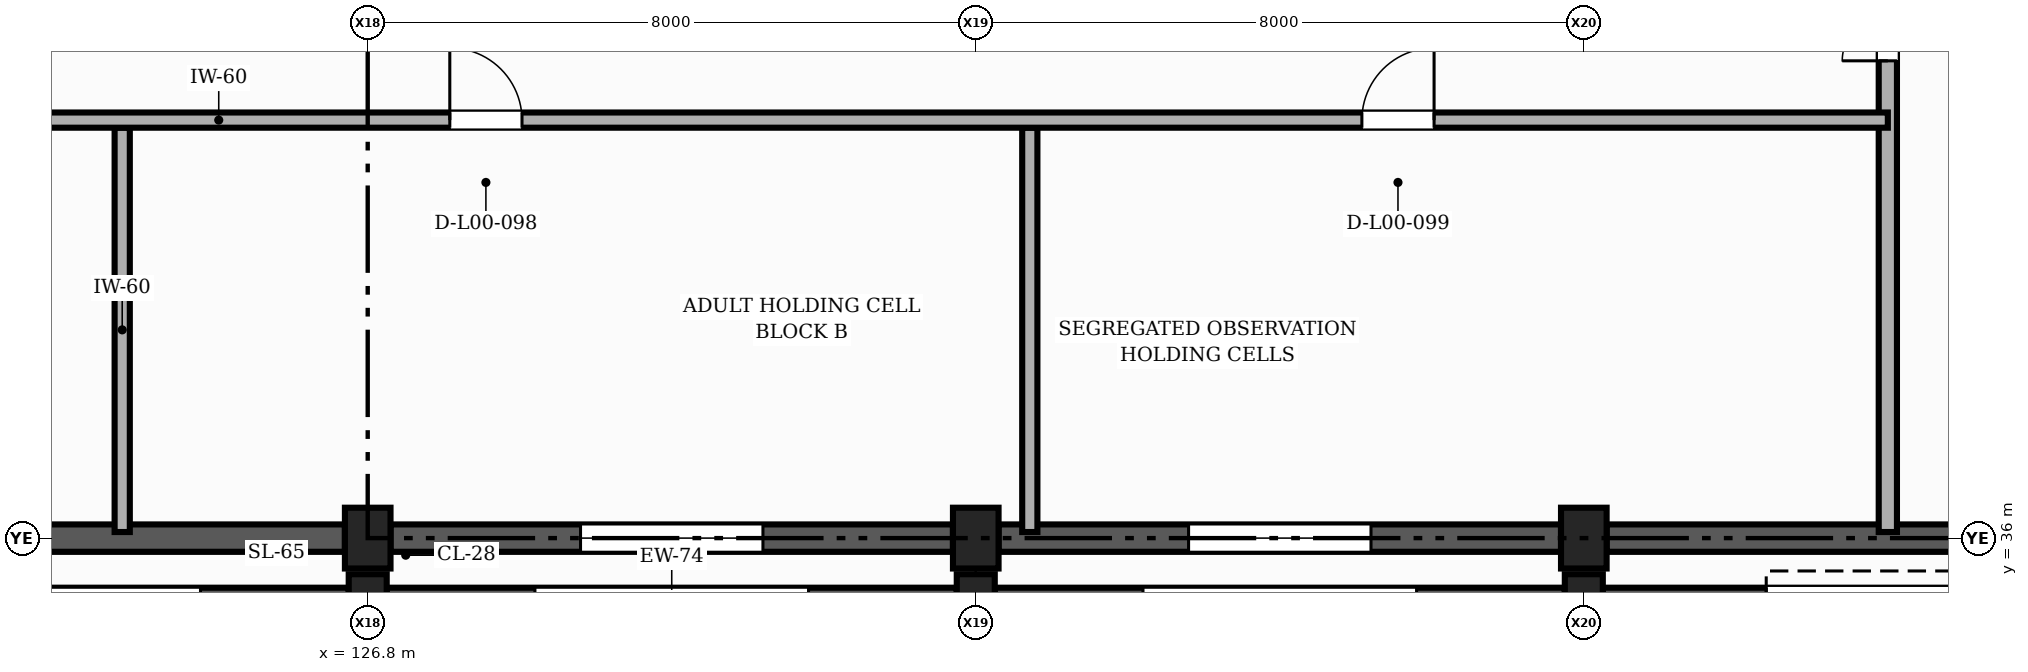
"""IFC4 building model, lengths in metres.
Left out: names, types, materials, properties, quantities, classifications, styles, units other than length and angle.
Written with IfcOpenShell. Run it as: python <this file> out.ifc"""

import sys

from ifc_helpers import new_model, si_unit, direction, frame, frame_2d, origin, origin_2d, place, context, subcontext, project, spatial, rectangle, extrude, element, fill, save


model = new_model("IFC4")
c1 = context("Model", 3, precision=1e-05, world=origin(), true_north=direction((0.0, 1.0)))
c2 = subcontext(c1, "Body", "Model", "MODEL_VIEW")
j1 = project(units=[si_unit("LENGTHUNIT", "METRE"), si_unit("PLANEANGLEUNIT", "RADIAN")], contexts=[c1])
p1 = place(None, origin())
s1 = spatial("IfcSite", under=j1, at=p1, CompositionType="ELEMENT")
p2 = place(p1, origin())
s2 = spatial("IfcBuilding", under=s1, at=p2, CompositionType="ELEMENT")
p3 = place(p2, origin())
s3 = spatial("IfcBuildingStorey", under=s2, at=p3, CompositionType="ELEMENT", Elevation=0.0)
p4 = place(p3, frame((126.8, 35.2, -0.5), z_axis=(0.0, 0.0, 1.0), x_axis=(1.0, 0.0, 0.0)))
e1 = element("IfcColumn", 1, at=p4, inside=s3, PredefinedType="COLUMN", context=c2, shape_type="SweptSolid", body=[
    extrude(rectangle(XDim=0.5, YDim=0.65, at=origin_2d()), origin(), (0.0, 0.0, 1.0), 5.3),
])
p5 = place(p3, frame((126.8, 36.0, -0.5), z_axis=(0.0, 0.0, 1.0), x_axis=(1.0, 0.0, 0.0)))
e2 = element("IfcColumn", 2, at=p5, inside=s3, PredefinedType="COLUMN", context=c2, shape_type="SweptSolid", body=[
    extrude(rectangle(XDim=0.6, YDim=0.8, at=origin_2d()), origin(), (0.0, 0.0, 1.0), 5.3),
])
p6 = place(p3, frame((134.8, 35.2, -0.5), z_axis=(0.0, 0.0, 1.0), x_axis=(1.0, 0.0, 0.0)))
e3 = element("IfcColumn", 3, at=p6, inside=s3, PredefinedType="COLUMN", context=c2, shape_type="SweptSolid", body=[
    extrude(rectangle(XDim=0.5, YDim=0.65, at=origin_2d()), origin(), (0.0, 0.0, 1.0), 5.3),
])
p7 = place(p3, frame((134.8, 36.0, -0.5), z_axis=(0.0, 0.0, 1.0), x_axis=(1.0, 0.0, 0.0)))
e4 = element("IfcColumn", 4, at=p7, inside=s3, PredefinedType="COLUMN", context=c2, shape_type="SweptSolid", body=[
    extrude(rectangle(XDim=0.6, YDim=0.8, at=origin_2d()), origin(), (0.0, 0.0, 1.0), 5.3),
])
p8 = place(p3, frame((142.8, 35.2, -0.5), z_axis=(0.0, 0.0, 1.0), x_axis=(1.0, 0.0, 0.0)))
e5 = element("IfcColumn", 5, at=p8, inside=s3, PredefinedType="COLUMN", context=c2, shape_type="SweptSolid", body=[
    extrude(rectangle(XDim=0.5, YDim=0.65, at=origin_2d()), origin(), (0.0, 0.0, 1.0), 5.3),
])
p9 = place(p3, frame((142.8, 36.0, -0.5), z_axis=(0.0, 0.0, 1.0), x_axis=(1.0, 0.0, 0.0)))
e6 = element("IfcColumn", 6, at=p9, inside=s3, PredefinedType="COLUMN", context=c2, shape_type="SweptSolid", body=[
    extrude(rectangle(XDim=0.6, YDim=0.8, at=origin_2d()), origin(), (0.0, 0.0, 1.0), 5.3),
])
p10 = place(p3, frame((150.55, 35.2, -0.42), z_axis=(0.0, 0.0, 1.0), x_axis=(-1.0, 0.0, 0.0)))
e7 = element("IfcWall", 7, at=p10, inside=s3, PredefinedType="SOLIDWALL", context=c2, shape_type="SweptSolid", body=[
    extrude(rectangle(XDim=7.5, YDim=0.295, at=frame_2d((3.75, 0.0))), origin(), (0.0, 0.0, 1.0), 4.333),
])
p11 = place(p10, frame((2.15, 0.0, 0.42)))
e8 = element("IfcOpeningElement", 8, at=p11, cuts=e7, PredefinedType="OPENING", context=c2, shape_type="SweptSolid", body=[
    extrude(rectangle(XDim=3.2, YDim=2.8, at=frame_2d((1.6, 1.4))), frame((0.0, 0.157, 0.0), z_axis=(0.0, -1.0, 0.0), x_axis=(1.0, 0.0, 0.0)), (0.0, 0.0, 1.0), 0.315),
])
p12 = place(p3, frame((142.55, 35.2, -0.42), z_axis=(0.0, 0.0, 1.0), x_axis=(-1.0, 0.0, 0.0)))
e9 = element("IfcWall", 9, at=p12, inside=s3, PredefinedType="SOLIDWALL", context=c2, shape_type="SweptSolid", body=[
    extrude(rectangle(XDim=7.5, YDim=0.295, at=frame_2d((3.75, 0.0))), origin(), (0.0, 0.0, 1.0), 4.333),
])
p13 = place(p12, frame((1.95, 0.0, 2.47)))
e10 = element("IfcOpeningElement", 10, at=p13, cuts=e9, PredefinedType="OPENING", context=c2, shape_type="SweptSolid", body=[
    extrude(rectangle(XDim=3.6, YDim=1.2, at=frame_2d((1.8, 0.6))), frame((0.0, 0.157, 0.0), z_axis=(0.0, -1.0, 0.0), x_axis=(1.0, 0.0, 0.0)), (0.0, 0.0, 1.0), 0.315),
])
p14 = place(p3, frame((134.55, 35.2, -0.42), z_axis=(0.0, 0.0, 1.0), x_axis=(-1.0, 0.0, 0.0)))
e11 = element("IfcWall", 11, at=p14, inside=s3, PredefinedType="SOLIDWALL", context=c2, shape_type="SweptSolid", body=[
    extrude(rectangle(XDim=7.5, YDim=0.295, at=frame_2d((3.75, 0.0))), origin(), (0.0, 0.0, 1.0), 4.333),
])
p15 = place(p14, frame((1.95, 0.0, 2.47)))
e12 = element("IfcOpeningElement", 12, at=p15, cuts=e11, PredefinedType="OPENING", context=c2, shape_type="SweptSolid", body=[
    extrude(rectangle(XDim=3.6, YDim=1.2, at=frame_2d((1.8, 0.6))), frame((0.0, 0.157, 0.0), z_axis=(0.0, -1.0, 0.0), x_axis=(1.0, 0.0, 0.0)), (0.0, 0.0, 1.0), 0.315),
])
p16 = place(p3, frame((126.55, 35.2, -0.42), z_axis=(0.0, 0.0, 1.0), x_axis=(-1.0, 0.0, 0.0)))
e13 = element("IfcWall", 13, at=p16, inside=s3, PredefinedType="SOLIDWALL", context=c2, shape_type="SweptSolid", body=[
    extrude(rectangle(XDim=7.5, YDim=0.295, at=frame_2d((3.75, 0.0))), origin(), (0.0, 0.0, 1.0), 4.333),
])
p17 = place(p16, frame((1.95, 0.0, 2.47)))
e14 = element("IfcOpeningElement", 14, at=p17, cuts=e13, PredefinedType="OPENING", context=c2, shape_type="SweptSolid", body=[
    extrude(rectangle(XDim=3.6, YDim=1.2, at=frame_2d((1.8, 0.6))), frame((0.0, 0.157, 0.0), z_axis=(0.0, -1.0, 0.0), x_axis=(1.0, 0.0, 0.0)), (0.0, 0.0, 1.0), 0.315),
])
p18 = place(p3, frame((119.1, 36.0, -0.42), z_axis=(0.0, 0.0, 1.0), x_axis=(1.0, 0.0, 0.0)))
e15 = element("IfcWall", 15, at=p18, inside=s3, PredefinedType="SOLIDWALL", context=c2, shape_type="SweptSolid", body=[
    extrude(rectangle(XDim=7.4, YDim=0.36, at=frame_2d((3.7, 0.0))), origin(), (0.0, 0.0, 1.0), 4.13),
])
p19 = place(p3, frame((127.1, 36.0, -0.42), z_axis=(0.0, 0.0, 1.0), x_axis=(1.0, 0.0, 0.0)))
e16 = element("IfcWall", 16, at=p19, inside=s3, PredefinedType="SOLIDWALL", context=c2, shape_type="SweptSolid", body=[
    extrude(rectangle(XDim=7.4, YDim=0.36, at=frame_2d((3.7, 0.0))), origin(), (0.0, 0.0, 1.0), 4.13),
])
p20 = place(p19, frame((2.5, 0.0, 2.52)))
e17 = element("IfcOpeningElement", 17, at=p20, cuts=e16, PredefinedType="OPENING", context=c2, shape_type="SweptSolid", body=[
    extrude(rectangle(XDim=2.4, YDim=0.75, at=frame_2d((1.2, 0.375))), frame((0.0, 0.19, 0.0), z_axis=(0.0, -1.0, 0.0), x_axis=(1.0, 0.0, 0.0)), (0.0, 0.0, 1.0), 0.38),
])
p21 = place(p3, frame((135.1, 36.0, -0.42), z_axis=(0.0, 0.0, 1.0), x_axis=(1.0, 0.0, 0.0)))
e18 = element("IfcWall", 18, at=p21, inside=s3, PredefinedType="SOLIDWALL", context=c2, shape_type="SweptSolid", body=[
    extrude(rectangle(XDim=7.4, YDim=0.36, at=frame_2d((3.7, 0.0))), origin(), (0.0, 0.0, 1.0), 4.13),
])
p22 = place(p21, frame((2.5, 0.0, 2.52)))
e19 = element("IfcOpeningElement", 19, at=p22, cuts=e18, PredefinedType="OPENING", context=c2, shape_type="SweptSolid", body=[
    extrude(rectangle(XDim=2.4, YDim=0.75, at=frame_2d((1.2, 0.375))), frame((0.0, 0.19, 0.0), z_axis=(0.0, -1.0, 0.0), x_axis=(1.0, 0.0, 0.0)), (0.0, 0.0, 1.0), 0.38),
])
p23 = place(p3, frame((143.1, 36.0, -0.42), z_axis=(0.0, 0.0, 1.0), x_axis=(1.0, 0.0, 0.0)))
e20 = element("IfcWall", 20, at=p23, inside=s3, PredefinedType="SOLIDWALL", context=c2, shape_type="SweptSolid", body=[
    extrude(rectangle(XDim=7.4, YDim=0.36, at=frame_2d((3.7, 0.0))), origin(), (0.0, 0.0, 1.0), 4.13),
])
for number, where, z_axis, x_axis in (
    (21, (123.57, 36.08, 0.0), (0.0, 0.0, 1.0), (0.0, 1.0, 0.0)),
    (22, (135.511, 36.08, 0.0), (0.0, 0.0, 1.0), (0.0, 1.0, 0.0)),
):
    element("IfcWall", number, at=place(p3, frame(where, z_axis=z_axis, x_axis=x_axis)), inside=s3, PredefinedType="PARTITIONING", context=c2, shape_type="SweptSolid", body=[
        extrude(rectangle(XDim=5.32, YDim=0.2, at=frame_2d((2.66, 0.0))), origin(), (0.0, 0.0, 1.0), 3.695),
    ])
p24 = place(p3, frame((146.8, 36.08, 0.0), z_axis=(0.0, 0.0, 1.0), x_axis=(0.0, 1.0, 0.0)))
e23 = element("IfcWall", 23, at=p24, inside=s3, PredefinedType="PARTITIONING", context=c2, shape_type="SweptSolid", body=[
    extrude(rectangle(XDim=15.84, YDim=0.24, at=frame_2d((7.92, 0.0))), origin(), (0.0, 0.0, 1.0), 3.695),
])
p25 = place(p24, frame((6.2, 0.0, 0.0)))
e24 = element("IfcOpeningElement", 24, at=p25, cuts=e23, PredefinedType="OPENING", context=c2, shape_type="SweptSolid", body=[
    extrude(rectangle(XDim=1.2, YDim=2.15, at=frame_2d((0.6, 1.075))), frame((0.0, 0.13, 0.0), z_axis=(0.0, -1.0, 0.0), x_axis=(1.0, 0.0, 0.0)), (0.0, 0.0, 1.0), 0.26),
])
p26 = place(p3, frame((102.88, 41.5, 0.0), z_axis=(0.0, 0.0, 1.0), x_axis=(1.0, 0.0, 0.0)))
e25 = element("IfcWall", 25, at=p26, inside=s3, PredefinedType="PARTITIONING", context=c2, shape_type="SweptSolid", body=[
    extrude(rectangle(XDim=43.92, YDim=0.2, at=frame_2d((21.96, 0.0))), origin(), (0.0, 0.0, 1.0), 3.695),
])
p27 = place(p26, frame((3.5, 0.0, 0.0)))
e26 = element("IfcOpeningElement", 26, at=p27, cuts=e25, PredefinedType="OPENING", context=c2, shape_type="SweptSolid", body=[
    extrude(rectangle(XDim=0.95, YDim=2.15, at=frame_2d((0.475, 1.075))), frame((0.0, 0.11, 0.0), z_axis=(0.0, -1.0, 0.0), x_axis=(1.0, 0.0, 0.0)), (0.0, 0.0, 1.0), 0.22),
])
p28 = place(p26, frame((13.0, 0.0, 0.0)))
e27 = element("IfcOpeningElement", 27, at=p28, cuts=e25, PredefinedType="OPENING", context=c2, shape_type="SweptSolid", body=[
    extrude(rectangle(XDim=0.95, YDim=2.2, at=frame_2d((0.475, 1.1))), frame((0.0, 0.11, 0.0), z_axis=(0.0, -1.0, 0.0), x_axis=(1.0, 0.0, 0.0)), (0.0, 0.0, 1.0), 0.22),
])
p29 = place(p26, frame((25.0, 0.0, 0.0)))
e28 = element("IfcOpeningElement", 28, at=p29, cuts=e25, PredefinedType="OPENING", context=c2, shape_type="SweptSolid", body=[
    extrude(rectangle(XDim=0.95, YDim=2.2, at=frame_2d((0.475, 1.1))), frame((0.0, 0.11, 0.0), z_axis=(0.0, -1.0, 0.0), x_axis=(1.0, 0.0, 0.0)), (0.0, 0.0, 1.0), 0.22),
])
p30 = place(p26, frame((37.0, 0.0, 0.0)))
e29 = element("IfcOpeningElement", 29, at=p30, cuts=e25, PredefinedType="OPENING", context=c2, shape_type="SweptSolid", body=[
    extrude(rectangle(XDim=0.95, YDim=2.2, at=frame_2d((0.475, 1.1))), frame((0.0, 0.11, 0.0), z_axis=(0.0, -1.0, 0.0), x_axis=(1.0, 0.0, 0.0)), (0.0, 0.0, 1.0), 0.22),
])
p31 = place(p20, origin())
e30 = element("IfcWindow", 30, at=p31, inside=s3, PartitioningType="SINGLE_PANEL", PredefinedType="WINDOW", context=c2, shape_type="SweptSolid", body=[
    extrude(rectangle(XDim=2.4, YDim=0.75, at=frame_2d((1.2, 0.375))), frame((0.0, 0.03, 0.0), z_axis=(0.0, -1.0, 0.0), x_axis=(1.0, 0.0, 0.0)), (0.0, 0.0, 1.0), 0.06),
])
fill(e17, e30)
p32 = place(p22, origin())
e31 = element("IfcWindow", 31, at=p32, inside=s3, PartitioningType="SINGLE_PANEL", PredefinedType="WINDOW", context=c2, shape_type="SweptSolid", body=[
    extrude(rectangle(XDim=2.4, YDim=0.75, at=frame_2d((1.2, 0.375))), frame((0.0, 0.03, 0.0), z_axis=(0.0, -1.0, 0.0), x_axis=(1.0, 0.0, 0.0)), (0.0, 0.0, 1.0), 0.06),
])
fill(e19, e31)
p33 = place(p25, origin())
e32 = element("IfcDoor", 32, at=p33, inside=s3, OperationType="DOUBLE_DOOR_SINGLE_SWING", PredefinedType="DOOR", context=c2, shape_type="SweptSolid", body=[
    extrude(rectangle(XDim=1.2, YDim=2.15, at=frame_2d((0.6, 1.075))), frame((0.0, 0.025, 0.0), z_axis=(0.0, -1.0, 0.0), x_axis=(1.0, 0.0, 0.0)), (0.0, 0.0, 1.0), 0.05),
])
fill(e24, e32)
p34 = place(p29, origin())
e33 = element("IfcDoor", 33, at=p34, inside=s3, OperationType="SINGLE_SWING_LEFT", PredefinedType="DOOR", context=c2, shape_type="SweptSolid", body=[
    extrude(rectangle(XDim=0.95, YDim=2.2, at=frame_2d((0.475, 1.1))), frame((0.0, 0.025, 0.0), z_axis=(0.0, -1.0, 0.0), x_axis=(1.0, 0.0, 0.0)), (0.0, 0.0, 1.0), 0.05),
])
fill(e28, e33)
p35 = place(p30, origin())
e34 = element("IfcDoor", 34, at=p35, inside=s3, OperationType="SINGLE_SWING_RIGHT", PredefinedType="DOOR", context=c2, shape_type="SweptSolid", body=[
    extrude(rectangle(XDim=0.95, YDim=2.2, at=frame_2d((0.475, 1.1))), frame((0.0, 0.025, 0.0), z_axis=(0.0, -1.0, 0.0), x_axis=(1.0, 0.0, 0.0)), (0.0, 0.0, 1.0), 0.05),
])
fill(e29, e34)
save(model, sys.argv[1])
